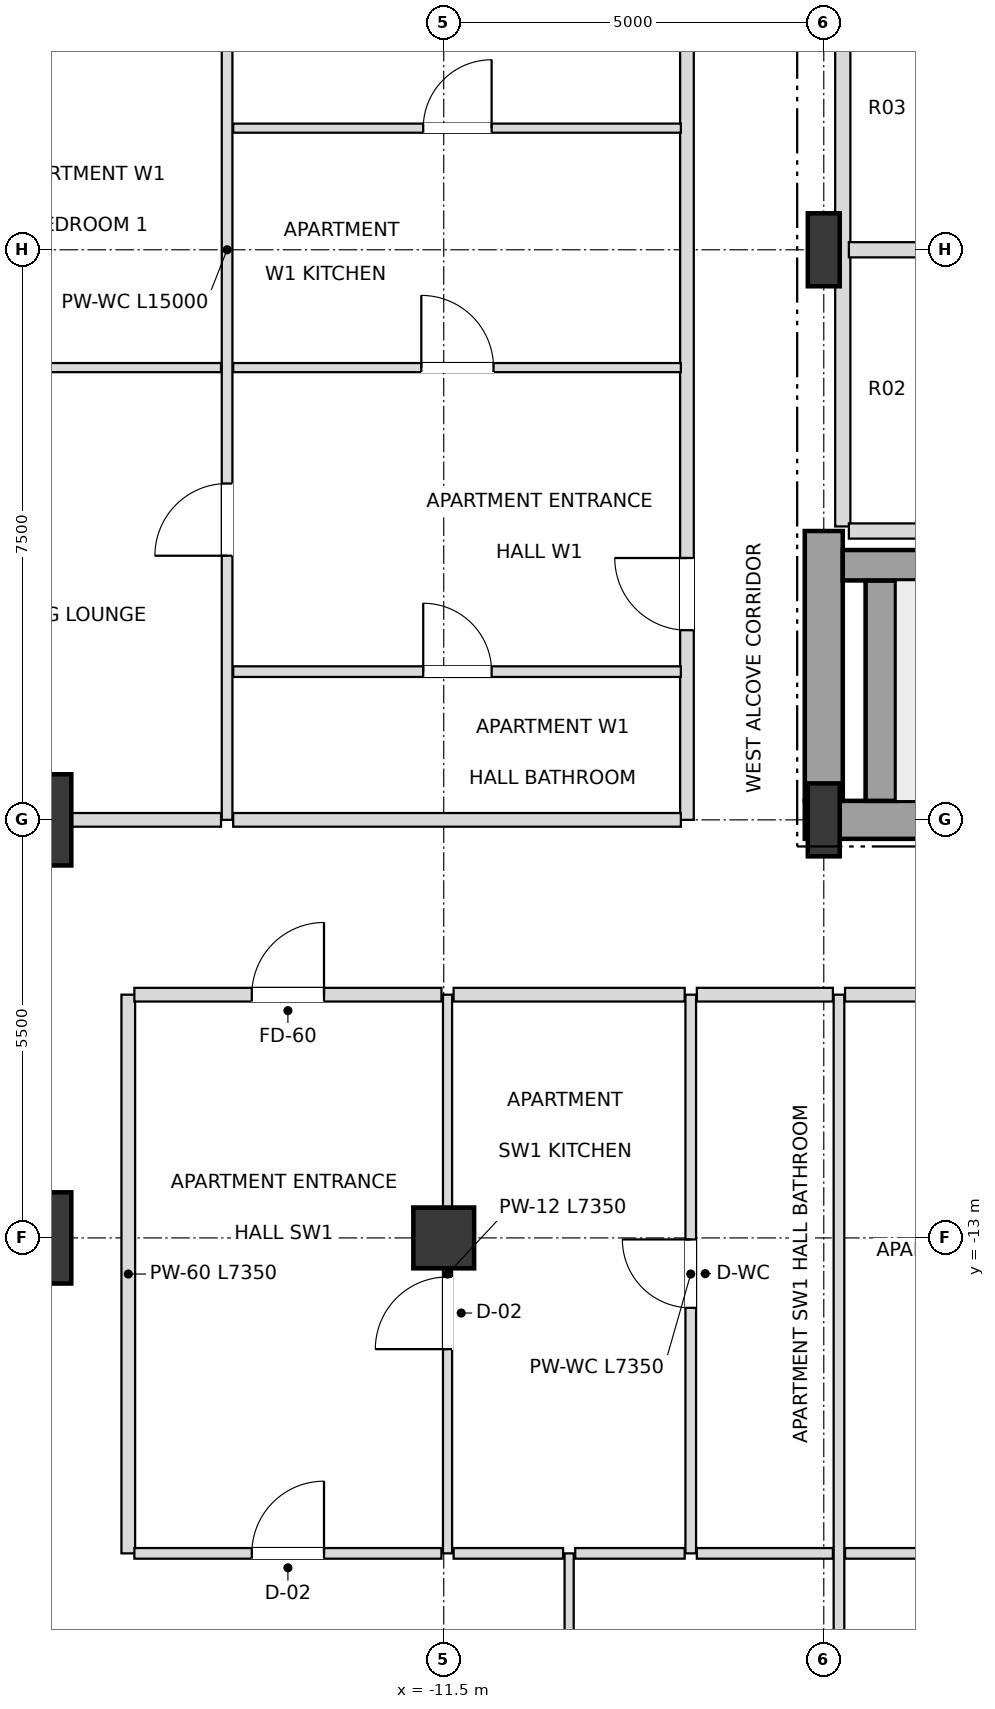
"""IFC4 building model, lengths in metres.
Left out: names, types, materials, properties, quantities, classifications, styles, units other than length and angle.
Written with IfcOpenShell. Run it as: python <this file> out.ifc"""

import sys

from ifc_helpers import new_model, si_unit, direction, frame, frame_2d, origin, origin_2d, place, context, subcontext, project, spatial, rectangle, i_section, extrude, element, fill, save


model = new_model("IFC4")
c1 = context("Model", 3, precision=1e-05, world=origin(), true_north=direction((0.0, 1.0)))
c2 = subcontext(c1, "Body", "Model", "MODEL_VIEW")
j1 = project(units=[si_unit("LENGTHUNIT", "METRE"), si_unit("PLANEANGLEUNIT", "RADIAN")], contexts=[c1])
p1 = place(None, origin())
s1 = spatial("IfcSite", under=j1, at=p1, CompositionType="ELEMENT")
p2 = place(p1, origin())
s2 = spatial("IfcBuilding", under=s1, at=p2, CompositionType="ELEMENT")
p3 = place(p2, frame((0.0, 0.0, 140.4)))
s3 = spatial("IfcBuildingStorey", under=s2, at=p3, CompositionType="ELEMENT", Elevation=140.4)
for number, where, z_axis, x_axis in (
    (1, (-6.5, -7.5, 0.0), (0.0, 0.0, 1.0), (1.0, 0.0, 0.0)),
    (2, (-6.5, 0.0, 0.0), (0.0, 0.0, 1.0), (1.0, 0.0, 0.0)),
):
    element("IfcColumn", number, at=place(p3, frame(where, z_axis=z_axis, x_axis=x_axis)), inside=s3, PredefinedType="COLUMN", context=c2, shape_type="SweptSolid", body=[
        extrude(i_section(OverallWidth=0.42, OverallDepth=0.96, WebThickness=0.022, FlangeThickness=0.034, at=origin_2d()), origin(), (0.0, 0.0, 1.0), 3.6),
    ])
for number, where, z_axis, x_axis in (
    (3, (-17.0, -7.5, 0.0), (0.0, 0.0, 1.0), (1.0, 0.0, 0.0)),
    (4, (-17.0, -13.0, 0.0), (0.0, 0.0, 1.0), (1.0, 0.0, 0.0)),
):
    element("IfcColumn", number, at=place(p3, frame(where, z_axis=z_axis, x_axis=x_axis)), inside=s3, PredefinedType="USERDEFINED", context=c2, shape_type="SweptSolid", body=[
        extrude(rectangle(XDim=1.2, YDim=1.2, at=origin_2d()), origin(), (0.0, 0.0, 1.0), 3.6),
    ])
p4 = place(p3, frame((-11.5, -13.0, 0.0), z_axis=(0.0, 0.0, 1.0), x_axis=(1.0, 0.0, 0.0)))
e5 = element("IfcColumn", 5, at=p4, inside=s3, PredefinedType="COLUMN", context=c2, shape_type="SweptSolid", body=[
    extrude(rectangle(XDim=0.8, YDim=0.8, at=origin_2d()), origin(), (0.0, 0.0, 1.0), 3.6),
])
p5 = place(p3, frame((-6.75, -7.5, 0.0), z_axis=(0.0, 0.0, 1.0), x_axis=(1.0, 0.0, 0.0)))
e6 = element("IfcWall", 6, at=p5, inside=s3, PredefinedType="SHEAR", context=c2, shape_type="SweptSolid", body=[
    extrude(rectangle(XDim=6.75, YDim=0.5, at=frame_2d((3.375, 0.0))), origin(), (0.0, 0.0, 1.0), 3.38),
])
p6 = place(p3, frame((-6.5, -7.25, 0.0), z_axis=(0.0, 0.0, 1.0), x_axis=(0.0, 1.0, 0.0)))
e7 = element("IfcWall", 7, at=p6, inside=s3, PredefinedType="SHEAR", context=c2, shape_type="SweptSolid", body=[
    extrude(rectangle(XDim=3.55, YDim=0.5, at=frame_2d((1.775, 0.0))), origin(), (0.0, 0.0, 1.0), 3.38),
])
p7 = place(p3, frame((-5.75, -7.25, 0.0), z_axis=(0.0, 0.0, 1.0), x_axis=(0.0, 1.0, 0.0)))
e8 = element("IfcWall", 8, at=p7, inside=s3, PredefinedType="SHEAR", context=c2, shape_type="SweptSolid", body=[
    extrude(rectangle(XDim=2.9, YDim=0.4, at=frame_2d((1.45, 0.0))), origin(), (0.0, 0.0, 1.0), 3.38),
])
p8 = place(p3, frame((-6.25, -4.15, 0.0), z_axis=(0.0, 0.0, 1.0), x_axis=(1.0, 0.0, 0.0)))
e9 = element("IfcWall", 9, at=p8, inside=s3, PredefinedType="SHEAR", context=c2, shape_type="SweptSolid", body=[
    extrude(rectangle(XDim=7.78, YDim=0.4, at=frame_2d((3.89, 0.0))), origin(), (0.0, 0.0, 1.0), 3.38),
])
p9 = place(p3, frame((-15.65, -17.15, 0.0), z_axis=(0.0, 0.0, 1.0), x_axis=(0.0, 1.0, 0.0)))
e10 = element("IfcWall", 10, at=p9, inside=s3, PredefinedType="PARTITIONING", context=c2, shape_type="SweptSolid", body=[
    extrude(rectangle(XDim=7.35, YDim=0.18, at=frame_2d((3.675, 0.0))), origin(), (0.0, 0.0, 1.0), 2.736),
])
p10 = place(p3, frame((-14.35, -7.5, 0.0), z_axis=(0.0, 0.0, 1.0), x_axis=(0.0, 1.0, 0.0)))
e11 = element("IfcWall", 11, at=p10, inside=s3, PredefinedType="PARTITIONING", context=c2, shape_type="SweptSolid", body=[
    extrude(rectangle(XDim=15.0, YDim=0.14, at=frame_2d((7.5, 0.0))), origin(), (0.0, 0.0, 1.0), 3.38),
])
p11 = place(p10, frame((3.475, 0.0, 0.0)))
e12 = element("IfcOpeningElement", 12, at=p11, cuts=e11, PredefinedType="OPENING", context=c2, shape_type="SweptSolid", body=[
    extrude(rectangle(XDim=0.95, YDim=2.1, at=frame_2d((0.475, 1.05))), frame((0.0, 0.08, 0.0), z_axis=(0.0, -1.0, 0.0), x_axis=(1.0, 0.0, 0.0)), (0.0, 0.0, 1.0), 0.16),
])
p12 = place(p3, frame((-11.45, -17.15, 0.0), z_axis=(0.0, 0.0, 1.0), x_axis=(0.0, 1.0, 0.0)))
e13 = element("IfcWall", 13, at=p12, inside=s3, PredefinedType="PARTITIONING", context=c2, shape_type="SweptSolid", body=[
    extrude(rectangle(XDim=7.35, YDim=0.12, at=frame_2d((3.675, 0.0))), origin(), (0.0, 0.0, 1.0), 2.736),
])
p13 = place(p12, frame((2.687, 0.0, 0.0)))
e14 = element("IfcOpeningElement", 14, at=p13, cuts=e13, PredefinedType="OPENING", context=c2, shape_type="SweptSolid", body=[
    extrude(rectangle(XDim=0.95, YDim=2.1, at=frame_2d((0.475, 1.05))), frame((0.0, 0.07, 0.0), z_axis=(0.0, -1.0, 0.0), x_axis=(1.0, 0.0, 0.0)), (0.0, 0.0, 1.0), 0.14),
])
p14 = place(p3, frame((-9.85, -23.15, 0.0), z_axis=(0.0, 0.0, 1.0), x_axis=(0.0, 1.0, 0.0)))
e15 = element("IfcWall", 15, at=p14, inside=s3, PredefinedType="PARTITIONING", context=c2, shape_type="SweptSolid", body=[
    extrude(rectangle(XDim=6.0, YDim=0.12, at=frame_2d((3.0, 0.0))), origin(), (0.0, 0.0, 1.0), 2.816),
])
p15 = place(p14, frame((1.399, 0.0, 0.0)))
e16 = element("IfcOpeningElement", 16, at=p15, cuts=e15, PredefinedType="OPENING", context=c2, shape_type="SweptSolid", body=[
    extrude(rectangle(XDim=0.9, YDim=2.1, at=frame_2d((0.45, 1.05))), frame((0.0, 0.07, 0.0), z_axis=(0.0, -1.0, 0.0), x_axis=(1.0, 0.0, 0.0)), (0.0, 0.0, 1.0), 0.14),
])
p16 = place(p3, frame((-8.3, -7.5, 0.0), z_axis=(0.0, 0.0, 1.0), x_axis=(0.0, 1.0, 0.0)))
e17 = element("IfcWall", 17, at=p16, inside=s3, PredefinedType="PARTITIONING", context=c2, shape_type="SweptSolid", body=[
    extrude(rectangle(XDim=15.0, YDim=0.18, at=frame_2d((7.5, 0.0))), origin(), (0.0, 0.0, 1.0), 3.38),
])
p17 = place(p16, frame((2.495, 0.0, 0.0)))
e18 = element("IfcOpeningElement", 18, at=p17, cuts=e17, PredefinedType="OPENING", context=c2, shape_type="SweptSolid", body=[
    extrude(rectangle(XDim=0.95, YDim=2.15, at=frame_2d((0.475, 1.075))), frame((0.0, 0.1, 0.0), z_axis=(0.0, -1.0, 0.0), x_axis=(1.0, 0.0, 0.0)), (0.0, 0.0, 1.0), 0.2),
])
p18 = place(p3, frame((-8.25, -17.15, 0.0), z_axis=(0.0, 0.0, 1.0), x_axis=(0.0, 1.0, 0.0)))
e19 = element("IfcWall", 19, at=p18, inside=s3, PredefinedType="PARTITIONING", context=c2, shape_type="SweptSolid", body=[
    extrude(rectangle(XDim=7.35, YDim=0.14, at=frame_2d((3.675, 0.0))), origin(), (0.0, 0.0, 1.0), 2.816),
])
p19 = place(p18, frame((3.23, 0.0, 0.0)))
e20 = element("IfcOpeningElement", 20, at=p19, cuts=e19, PredefinedType="OPENING", context=c2, shape_type="SweptSolid", body=[
    extrude(rectangle(XDim=0.9, YDim=2.1, at=frame_2d((0.45, 1.05))), frame((0.0, 0.08, 0.0), z_axis=(0.0, -1.0, 0.0), x_axis=(1.0, 0.0, 0.0)), (0.0, 0.0, 1.0), 0.16),
])
p20 = place(p3, frame((-6.3, -23.15, 0.0), z_axis=(0.0, 0.0, 1.0), x_axis=(0.0, 1.0, 0.0)))
e21 = element("IfcWall", 21, at=p20, inside=s3, PredefinedType="PARTITIONING", context=c2, shape_type="SweptSolid", body=[
    extrude(rectangle(XDim=13.35, YDim=0.14, at=frame_2d((6.675, 0.0))), origin(), (0.0, 0.0, 1.0), 2.816),
])
p21 = place(p20, frame((1.399, 0.0, 0.0)))
e22 = element("IfcOpeningElement", 22, at=p21, cuts=e21, PredefinedType="OPENING", context=c2, shape_type="SweptSolid", body=[
    extrude(rectangle(XDim=0.9, YDim=2.1, at=frame_2d((0.45, 1.05))), frame((0.0, 0.08, 0.0), z_axis=(0.0, -1.0, 0.0), x_axis=(1.0, 0.0, 0.0)), (0.0, 0.0, 1.0), 0.16),
])
p22 = place(p3, frame((-6.25, -3.64, 0.0), z_axis=(0.0, 0.0, 1.0), x_axis=(0.0, 1.0, 0.0)))
e23 = element("IfcWall", 23, at=p22, inside=s3, PredefinedType="SOLIDWALL", context=c2, shape_type="SweptSolid", body=[
    extrude(rectangle(XDim=7.34, YDim=0.2, at=frame_2d((3.67, 0.0))), origin(), (0.0, 0.0, 1.0), 3.38),
])
p23 = place(p3, frame((-15.57, -17.15, 0.0), z_axis=(0.0, 0.0, 1.0), x_axis=(1.0, 0.0, 0.0)))
e24 = element("IfcWall", 24, at=p23, inside=s3, PredefinedType="PARTITIONING", context=c2, shape_type="SweptSolid", body=[
    extrude(rectangle(XDim=4.04, YDim=0.14, at=frame_2d((2.02, 0.0))), origin(), (0.0, 0.0, 1.0), 2.736),
])
p24 = place(p23, frame((1.545, 0.0, 0.0)))
e25 = element("IfcOpeningElement", 25, at=p24, cuts=e24, PredefinedType="OPENING", context=c2, shape_type="SweptSolid", body=[
    extrude(rectangle(XDim=0.95, YDim=2.1, at=frame_2d((0.475, 1.05))), frame((0.0, 0.08, 0.0), z_axis=(0.0, -1.0, 0.0), x_axis=(1.0, 0.0, 0.0)), (0.0, 0.0, 1.0), 0.16),
])
p25 = place(p3, frame((-11.37, -17.15, 0.0), z_axis=(0.0, 0.0, 1.0), x_axis=(1.0, 0.0, 0.0)))
e26 = element("IfcWall", 26, at=p25, inside=s3, PredefinedType="PARTITIONING", context=c2, shape_type="SweptSolid", body=[
    extrude(rectangle(XDim=1.44, YDim=0.14, at=frame_2d((0.72, 0.0))), origin(), (0.0, 0.0, 1.0), 3.38),
])
p26 = place(p3, frame((-9.77, -17.15, 0.0), z_axis=(0.0, 0.0, 1.0), x_axis=(1.0, 0.0, 0.0)))
e27 = element("IfcWall", 27, at=p26, inside=s3, PredefinedType="PARTITIONING", context=c2, shape_type="SweptSolid", body=[
    extrude(rectangle(XDim=1.44, YDim=0.14, at=frame_2d((0.72, 0.0))), origin(), (0.0, 0.0, 1.0), 3.38),
])
p27 = place(p3, frame((-8.17, -17.15, 0.0), z_axis=(0.0, 0.0, 1.0), x_axis=(1.0, 0.0, 0.0)))
e28 = element("IfcWall", 28, at=p27, inside=s3, PredefinedType="PARTITIONING", context=c2, shape_type="SweptSolid", body=[
    extrude(rectangle(XDim=1.79, YDim=0.14, at=frame_2d((0.895, 0.0))), origin(), (0.0, 0.0, 1.0), 2.816),
])
p28 = place(p3, frame((-6.22, -17.15, 0.0), z_axis=(0.0, 0.0, 1.0), x_axis=(1.0, 0.0, 0.0)))
e29 = element("IfcWall", 29, at=p28, inside=s3, PredefinedType="PARTITIONING", context=c2, shape_type="SweptSolid", body=[
    extrude(rectangle(XDim=4.94, YDim=0.14, at=frame_2d((2.47, 0.0))), origin(), (0.0, 0.0, 1.0), 3.38),
])
p29 = place(p28, frame((1.995, 0.0, 0.0)))
e30 = element("IfcOpeningElement", 30, at=p29, cuts=e29, PredefinedType="OPENING", context=c2, shape_type="SweptSolid", body=[
    extrude(rectangle(XDim=0.95, YDim=2.1, at=frame_2d((0.475, 1.05))), frame((0.0, 0.08, 0.0), z_axis=(0.0, -1.0, 0.0), x_axis=(1.0, 0.0, 0.0)), (0.0, 0.0, 1.0), 0.16),
])
p30 = place(p3, frame((-15.57, -9.8, 0.0), z_axis=(0.0, 0.0, 1.0), x_axis=(1.0, 0.0, 0.0)))
e31 = element("IfcWall", 31, at=p30, inside=s3, PredefinedType="PARTITIONING", context=c2, shape_type="SweptSolid", body=[
    extrude(rectangle(XDim=4.04, YDim=0.18, at=frame_2d((2.02, 0.0))), origin(), (0.0, 0.0, 1.0), 3.38),
])
p31 = place(p30, frame((1.545, 0.0, 0.0)))
e32 = element("IfcOpeningElement", 32, at=p31, cuts=e31, PredefinedType="OPENING", context=c2, shape_type="SweptSolid", body=[
    extrude(rectangle(XDim=0.95, YDim=2.15, at=frame_2d((0.475, 1.075))), frame((0.0, 0.1, 0.0), z_axis=(0.0, -1.0, 0.0), x_axis=(1.0, 0.0, 0.0)), (0.0, 0.0, 1.0), 0.2),
])
p32 = place(p3, frame((-11.37, -9.8, 0.0), z_axis=(0.0, 0.0, 1.0), x_axis=(1.0, 0.0, 0.0)))
e33 = element("IfcWall", 33, at=p32, inside=s3, PredefinedType="PARTITIONING", context=c2, shape_type="SweptSolid", body=[
    extrude(rectangle(XDim=3.04, YDim=0.18, at=frame_2d((1.52, 0.0))), origin(), (0.0, 0.0, 1.0), 3.38),
])
p33 = place(p3, frame((-8.17, -9.8, 0.0), z_axis=(0.0, 0.0, 1.0), x_axis=(1.0, 0.0, 0.0)))
e34 = element("IfcWall", 34, at=p33, inside=s3, PredefinedType="PARTITIONING", context=c2, shape_type="SweptSolid", body=[
    extrude(rectangle(XDim=1.79, YDim=0.18, at=frame_2d((0.895, 0.0))), origin(), (0.0, 0.0, 1.0), 2.816),
])
p34 = place(p3, frame((-6.22, -9.8, 0.0), z_axis=(0.0, 0.0, 1.0), x_axis=(1.0, 0.0, 0.0)))
e35 = element("IfcWall", 35, at=p34, inside=s3, PredefinedType="PARTITIONING", context=c2, shape_type="SweptSolid", body=[
    extrude(rectangle(XDim=4.94, YDim=0.18, at=frame_2d((2.47, 0.0))), origin(), (0.0, 0.0, 1.0), 3.38),
])
p35 = place(p3, frame((-20.15, -7.5, 0.0), z_axis=(0.0, 0.0, 1.0), x_axis=(1.0, 0.0, 0.0)))
e36 = element("IfcWall", 36, at=p35, inside=s3, PredefinedType="PARTITIONING", context=c2, shape_type="SweptSolid", body=[
    extrude(rectangle(XDim=5.72, YDim=0.18, at=frame_2d((2.86, 0.0))), origin(), (0.0, 0.0, 1.0), 2.816),
])
p36 = place(p3, frame((-14.27, -7.5, 0.0), z_axis=(0.0, 0.0, 1.0), x_axis=(1.0, 0.0, 0.0)))
e37 = element("IfcWall", 37, at=p36, inside=s3, PredefinedType="PARTITIONING", context=c2, shape_type="SweptSolid", body=[
    extrude(rectangle(XDim=5.89, YDim=0.18, at=frame_2d((2.945, 0.0))), origin(), (0.0, 0.0, 1.0), 2.816),
])
p37 = place(p3, frame((-14.27, -5.55, 0.0), z_axis=(0.0, 0.0, 1.0), x_axis=(1.0, 0.0, 0.0)))
e38 = element("IfcWall", 38, at=p37, inside=s3, PredefinedType="PARTITIONING", context=c2, shape_type="SweptSolid", body=[
    extrude(rectangle(XDim=5.89, YDim=0.14, at=frame_2d((2.945, 0.0))), origin(), (0.0, 0.0, 1.0), 3.38),
])
p38 = place(p37, frame((2.5, 0.0, 0.0)))
e39 = element("IfcOpeningElement", 39, at=p38, cuts=e38, PredefinedType="OPENING", context=c2, shape_type="SweptSolid", body=[
    extrude(rectangle(XDim=0.9, YDim=2.1, at=frame_2d((0.45, 1.05))), frame((0.0, 0.08, 0.0), z_axis=(0.0, -1.0, 0.0), x_axis=(1.0, 0.0, 0.0)), (0.0, 0.0, 1.0), 0.16),
])
p39 = place(p3, frame((-6.17, -3.7, 0.0), z_axis=(0.0, 0.0, 1.0), x_axis=(1.0, 0.0, 0.0)))
e40 = element("IfcWall", 40, at=p39, inside=s3, PredefinedType="SOLIDWALL", context=c2, shape_type="SweptSolid", body=[
    extrude(rectangle(XDim=1.94, YDim=0.2, at=frame_2d((0.97, 0.0))), origin(), (0.0, 0.0, 1.0), 3.38),
])
p40 = place(p3, frame((-20.07, -1.55, 0.0), z_axis=(0.0, 0.0, 1.0), x_axis=(1.0, 0.0, 0.0)))
e41 = element("IfcWall", 41, at=p40, inside=s3, PredefinedType="PARTITIONING", context=c2, shape_type="SweptSolid", body=[
    extrude(rectangle(XDim=5.64, YDim=0.12, at=frame_2d((2.82, 0.0))), origin(), (0.0, 0.0, 1.0), 2.816),
])
p41 = place(p40, frame((2.37, 0.0, 0.0)))
e42 = element("IfcOpeningElement", 42, at=p41, cuts=e41, PredefinedType="OPENING", context=c2, shape_type="SweptSolid", body=[
    extrude(rectangle(XDim=0.9, YDim=2.1, at=frame_2d((0.45, 1.05))), frame((0.0, 0.07, 0.0), z_axis=(0.0, -1.0, 0.0), x_axis=(1.0, 0.0, 0.0)), (0.0, 0.0, 1.0), 0.14),
])
p42 = place(p3, frame((-14.27, -1.55, 0.0), z_axis=(0.0, 0.0, 1.0), x_axis=(1.0, 0.0, 0.0)))
e43 = element("IfcWall", 43, at=p42, inside=s3, PredefinedType="PARTITIONING", context=c2, shape_type="SweptSolid", body=[
    extrude(rectangle(XDim=5.89, YDim=0.12, at=frame_2d((2.945, 0.0))), origin(), (0.0, 0.0, 1.0), 3.38),
])
p43 = place(p42, frame((2.475, 0.0, 0.0)))
e44 = element("IfcOpeningElement", 44, at=p43, cuts=e43, PredefinedType="OPENING", context=c2, shape_type="SweptSolid", body=[
    extrude(rectangle(XDim=0.95, YDim=2.1, at=frame_2d((0.475, 1.05))), frame((0.0, 0.07, 0.0), z_axis=(0.0, -1.0, 0.0), x_axis=(1.0, 0.0, 0.0)), (0.0, 0.0, 1.0), 0.14),
])
p44 = place(p3, frame((-6.17, 0.0, 0.0), z_axis=(0.0, 0.0, 1.0), x_axis=(1.0, 0.0, 0.0)))
e45 = element("IfcWall", 45, at=p44, inside=s3, PredefinedType="SOLIDWALL", context=c2, shape_type="SweptSolid", body=[
    extrude(rectangle(XDim=1.94, YDim=0.2, at=frame_2d((0.97, 0.0))), origin(), (0.0, 0.0, 1.0), 3.38),
])
p45 = place(p3, frame((-14.27, 1.6, 0.0), z_axis=(0.0, 0.0, 1.0), x_axis=(1.0, 0.0, 0.0)))
e46 = element("IfcWall", 46, at=p45, inside=s3, PredefinedType="PARTITIONING", context=c2, shape_type="SweptSolid", body=[
    extrude(rectangle(XDim=5.89, YDim=0.12, at=frame_2d((2.945, 0.0))), origin(), (0.0, 0.0, 1.0), 3.38),
])
p46 = place(p45, frame((2.5, 0.0, 0.0)))
e47 = element("IfcOpeningElement", 47, at=p46, cuts=e46, PredefinedType="OPENING", context=c2, shape_type="SweptSolid", body=[
    extrude(rectangle(XDim=0.9, YDim=2.1, at=frame_2d((0.45, 1.05))), frame((0.0, 0.07, 0.0), z_axis=(0.0, -1.0, 0.0), x_axis=(1.0, 0.0, 0.0)), (0.0, 0.0, 1.0), 0.14),
])
p47 = place(p31, origin())
e48 = element("IfcDoor", 48, at=p47, inside=s3, OperationType="SINGLE_SWING_RIGHT", PredefinedType="DOOR", context=c2, shape_type="SweptSolid", body=[
    extrude(rectangle(XDim=0.95, YDim=2.15, at=frame_2d((0.475, 1.075))), frame((0.0, 0.025, 0.0), z_axis=(0.0, -1.0, 0.0), x_axis=(1.0, 0.0, 0.0)), (0.0, 0.0, 1.0), 0.05),
])
fill(e32, e48)
p48 = place(p13, origin())
e49 = element("IfcDoor", 49, at=p48, inside=s3, OperationType="SINGLE_SWING_LEFT", PredefinedType="DOOR", context=c2, shape_type="SweptSolid", body=[
    extrude(rectangle(XDim=0.95, YDim=2.1, at=frame_2d((0.475, 1.05))), frame((0.0, 0.025, 0.0), z_axis=(0.0, -1.0, 0.0), x_axis=(1.0, 0.0, 0.0)), (0.0, 0.0, 1.0), 0.05),
])
fill(e14, e49)
p49 = place(p19, origin())
e50 = element("IfcDoor", 50, at=p49, inside=s3, OperationType="SINGLE_SWING_RIGHT", PredefinedType="DOOR", context=c2, shape_type="SweptSolid", body=[
    extrude(rectangle(XDim=0.9, YDim=2.1, at=frame_2d((0.45, 1.05))), frame((0.0, 0.025, 0.0), z_axis=(0.0, -1.0, 0.0), x_axis=(1.0, 0.0, 0.0)), (0.0, 0.0, 1.0), 0.05),
])
fill(e20, e50)
p50 = place(p24, origin())
e51 = element("IfcDoor", 51, at=p50, inside=s3, OperationType="SINGLE_SWING_RIGHT", PredefinedType="DOOR", context=c2, shape_type="SweptSolid", body=[
    extrude(rectangle(XDim=0.95, YDim=2.1, at=frame_2d((0.475, 1.05))), frame((0.0, 0.025, 0.0), z_axis=(0.0, -1.0, 0.0), x_axis=(1.0, 0.0, 0.0)), (0.0, 0.0, 1.0), 0.05),
])
fill(e25, e51)
p51 = place(p38, origin())
e52 = element("IfcDoor", 52, at=p51, inside=s3, OperationType="SINGLE_SWING_LEFT", PredefinedType="DOOR", context=c2, shape_type="SweptSolid", body=[
    extrude(rectangle(XDim=0.9, YDim=2.1, at=frame_2d((0.45, 1.05))), frame((0.0, 0.025, 0.0), z_axis=(0.0, -1.0, 0.0), x_axis=(1.0, 0.0, 0.0)), (0.0, 0.0, 1.0), 0.05),
])
fill(e39, e52)
p52 = place(p17, origin())
e53 = element("IfcDoor", 53, at=p52, inside=s3, OperationType="SINGLE_SWING_RIGHT", PredefinedType="DOOR", context=c2, shape_type="SweptSolid", body=[
    extrude(rectangle(XDim=0.95, YDim=2.15, at=frame_2d((0.475, 1.075))), frame((0.0, 0.025, 0.0), z_axis=(0.0, -1.0, 0.0), x_axis=(1.0, 0.0, 0.0)), (0.0, 0.0, 1.0), 0.05),
])
fill(e18, e53)
p53 = place(p43, origin())
e54 = element("IfcDoor", 54, at=p53, inside=s3, OperationType="SINGLE_SWING_LEFT", PredefinedType="DOOR", context=c2, shape_type="SweptSolid", body=[
    extrude(rectangle(XDim=0.95, YDim=2.1, at=frame_2d((0.475, 1.05))), frame((0.0, 0.025, 0.0), z_axis=(0.0, -1.0, 0.0), x_axis=(1.0, 0.0, 0.0)), (0.0, 0.0, 1.0), 0.05),
])
fill(e44, e54)
p54 = place(p46, origin())
e55 = element("IfcDoor", 55, at=p54, inside=s3, OperationType="SINGLE_SWING_RIGHT", PredefinedType="DOOR", context=c2, shape_type="SweptSolid", body=[
    extrude(rectangle(XDim=0.9, YDim=2.1, at=frame_2d((0.45, 1.05))), frame((0.0, 0.025, 0.0), z_axis=(0.0, -1.0, 0.0), x_axis=(1.0, 0.0, 0.0)), (0.0, 0.0, 1.0), 0.05),
])
fill(e47, e55)
p55 = place(p11, origin())
e56 = element("IfcDoor", 56, at=p55, inside=s3, OperationType="SINGLE_SWING_LEFT", PredefinedType="DOOR", context=c2, shape_type="SweptSolid", body=[
    extrude(rectangle(XDim=0.95, YDim=2.1, at=frame_2d((0.475, 1.05))), frame((0.0, 0.025, 0.0), z_axis=(0.0, -1.0, 0.0), x_axis=(1.0, 0.0, 0.0)), (0.0, 0.0, 1.0), 0.05),
])
fill(e12, e56)
save(model, sys.argv[1])
